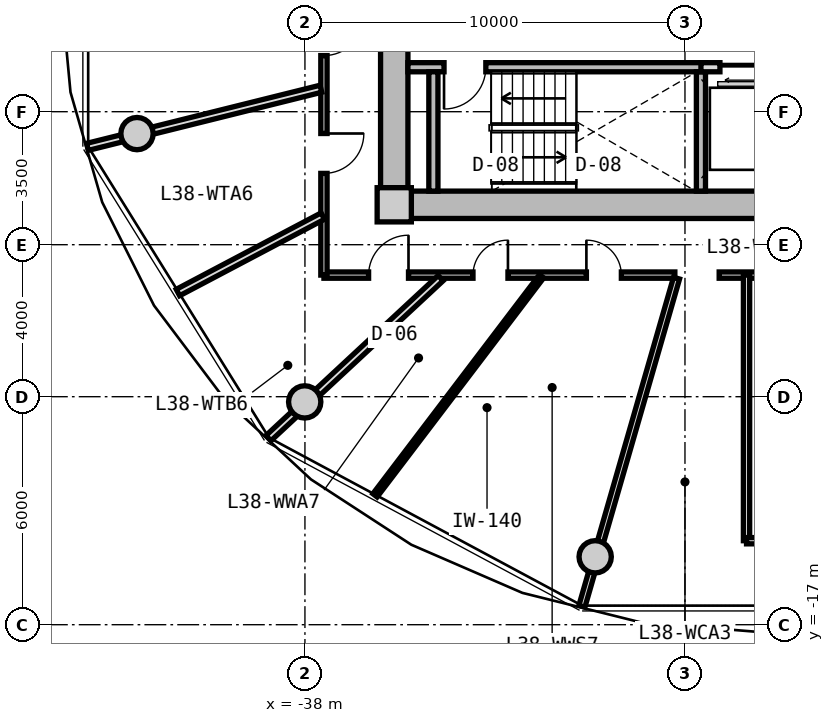
"""IFC4 building model, lengths in metres.
Left out: names, types, materials, properties, quantities, classifications, styles, units other than length and angle.
Written with IfcOpenShell. Run it as: python <this file> out.ifc"""

import sys

from ifc_helpers import new_model, si_unit, direction, frame, frame_2d, origin, origin_2d, place, context, subcontext, project, spatial, rectangle, circle, extrude, source, transform, mapped, element, fill, save


model = new_model("IFC4")
c1 = context("Model", 3, precision=1e-05, world=origin(), true_north=direction((0.0, 1.0)))
c2 = subcontext(c1, "Body", "Model", "MODEL_VIEW")
j1 = project(units=[si_unit("LENGTHUNIT", "METRE"), si_unit("PLANEANGLEUNIT", "RADIAN")], contexts=[c1])
p1 = place(None, origin())
s1 = spatial("IfcSite", under=j1, at=p1, CompositionType="ELEMENT")
p2 = place(p1, origin())
s2 = spatial("IfcBuilding", under=s1, at=p2, CompositionType="ELEMENT")
p3 = place(p2, frame((0.0, 0.0, 123.7)))
s3 = spatial("IfcBuildingStorey", under=s2, at=p3, CompositionType="ELEMENT", Elevation=123.7)
m1 = source(origin(), c2, "Body", "SweptSolid", [
    extrude(rectangle(XDim=0.9, YDim=0.9, at=origin_2d()), origin(), (0.0, 0.0, 1.0), 3.05),
])
p4 = place(p3, frame((-35.65, -5.95, 0.0), z_axis=(0.0, 0.0, 1.0), x_axis=(1.0, 0.0, 0.0)))
e1 = element("IfcColumn", 1, at=p4, inside=s3, PredefinedType="COLUMN", context=c2, shape_type="MappedRepresentation", body=[
    mapped(m1, transform((0.0, 0.0, 0.0), x_axis=(1.0, 0.0, 0.0), y_axis=(0.0, 1.0, 0.0), z_axis=(0.0, 0.0, 1.0), scale=1.0)),
])
m2 = source(origin(), c2, "Body", "SweptSolid", [
    extrude(rectangle(XDim=14.4, YDim=0.72, at=frame_2d((7.2, 0.0))), origin(), (0.0, 0.0, 1.0), 2.79),
])
p5 = place(p3, frame((-20.8, -5.95, 0.0), z_axis=(0.0, 0.0, 1.0), x_axis=(-1.0, 0.0, 0.0)))
e2 = element("IfcWall", 2, at=p5, inside=s3, PredefinedType="SHEAR", context=c2, shape_type="MappedRepresentation", body=[
    mapped(m2, transform((0.0, 0.0, 0.0), x_axis=(1.0, 0.0, 0.0), y_axis=(0.0, 1.0, 0.0), z_axis=(0.0, 0.0, 1.0), scale=1.0)),
])
m3 = source(origin(), c2, "Body", "SweptSolid", [
    extrude(rectangle(XDim=11.0, YDim=0.72, at=frame_2d((5.5, 0.0))), origin(), (0.0, 0.0, 1.0), 2.79),
])
p6 = place(p3, frame((-35.65, -5.5, 0.0), z_axis=(0.0, 0.0, 1.0), x_axis=(0.0, 1.0, 0.0)))
e3 = element("IfcWall", 3, at=p6, inside=s3, PredefinedType="SHEAR", context=c2, shape_type="MappedRepresentation", body=[
    mapped(m3, transform((0.0, 0.0, 0.0), x_axis=(1.0, 0.0, 0.0), y_axis=(0.0, 1.0, 0.0), z_axis=(0.0, 0.0, 1.0), scale=1.0)),
])
p7 = place(p6, frame((3.8, 0.0, 0.0)))
e4 = element("IfcOpeningElement", 4, at=p7, cuts=e3, PredefinedType="OPENING", context=c2, shape_type="SweptSolid", body=[
    extrude(rectangle(XDim=1.2, YDim=2.15, at=frame_2d((0.6, 1.075))), frame((0.0, 0.37, 0.0), z_axis=(0.0, -1.0, 0.0), x_axis=(1.0, 0.0, 0.0)), (0.0, 0.0, 1.0), 0.74),
])
m4 = source(origin(), c2, "Body", "SweptSolid", [
    extrude(circle(Radius=0.425, at=origin_2d()), origin(), (0.0, 0.0, 1.0), 3.05),
])
for number, where, z_axis, x_axis in (
    (5, (-42.419, -4.076, 0.0), (0.0, 0.0, 1.0), (1.0, 0.0, 0.0)),
    (6, (-38.006, -11.137, 0.0), (0.0, 0.0, 1.0), (1.0, 0.0, 0.0)),
    (7, (-30.363, -15.213, 0.0), (0.0, 0.0, 1.0), (1.0, 0.0, 0.0)),
):
    element("IfcColumn", number, at=place(p3, frame(where, z_axis=z_axis, x_axis=x_axis)), inside=s3, PredefinedType="COLUMN", context=c2, shape_type="MappedRepresentation", body=[
        mapped(m4, transform((0.0, 0.0, 0.0), x_axis=(1.0, 0.0, 0.0), y_axis=(0.0, 1.0, 0.0), z_axis=(0.0, 0.0, 1.0), scale=1.0)),
    ])
m5 = source(origin(), c2, "Body", "SweptSolid", [
    extrude(rectangle(XDim=7.83, YDim=0.24, at=frame_2d((3.915, 0.0))), origin(), (0.0, 0.0, 1.0), 2.79),
])
p8 = place(p3, frame((-35.29, -2.33, 0.0), z_axis=(0.0, 0.0, 1.0), x_axis=(1.0, 0.0, 0.0)))
e8 = element("IfcWall", 8, at=p8, inside=s3, PredefinedType="PARTITIONING", context=c2, shape_type="MappedRepresentation", body=[
    mapped(m5, transform((0.0, 0.0, 0.0), x_axis=(1.0, 0.0, 0.0), y_axis=(0.0, 1.0, 0.0), z_axis=(0.0, 0.0, 1.0), scale=1.0)),
])
p9 = place(p8, frame((0.95, 0.0, 0.0)))
e9 = element("IfcOpeningElement", 9, at=p9, cuts=e8, PredefinedType="OPENING", context=c2, shape_type="SweptSolid", body=[
    extrude(rectangle(XDim=1.1, YDim=2.15, at=frame_2d((0.55, 1.075))), frame((0.0, 0.13, 0.0), z_axis=(0.0, -1.0, 0.0), x_axis=(1.0, 0.0, 0.0)), (0.0, 0.0, 1.0), 0.26),
])
m6 = source(origin(), c2, "Body", "SweptSolid", [
    extrude(rectangle(XDim=3.14, YDim=0.24, at=frame_2d((1.57, 0.0))), origin(), (0.0, 0.0, 1.0), 2.79),
])
for number, where, z_axis, x_axis in (
    (10, (-34.62, -5.59, 0.0), (0.0, 0.0, 1.0), (0.0, 1.0, 0.0)),
    (11, (-27.58, -5.59, 0.0), (0.0, 0.0, 1.0), (0.0, 1.0, 0.0)),
):
    element("IfcWall", number, at=place(p3, frame(where, z_axis=z_axis, x_axis=x_axis)), inside=s3, PredefinedType="PARTITIONING", context=c2, shape_type="MappedRepresentation", body=[
        mapped(m6, transform((0.0, 0.0, 0.0), x_axis=(1.0, 0.0, 0.0), y_axis=(0.0, 1.0, 0.0), z_axis=(0.0, 0.0, 1.0), scale=1.0)),
    ])
m7 = source(origin(), c2, "Body", "SweptSolid", [
    extrude(rectangle(XDim=4.13, YDim=0.24, at=frame_2d((2.065, 0.0))), origin(), (0.0, 0.0, 1.0), 2.775),
])
p10 = place(p3, frame((-27.58, -2.33, 0.0), z_axis=(0.0, 0.0, 1.0), x_axis=(1.0, 0.0, 0.0)))
e12 = element("IfcWall", 12, at=p10, inside=s3, PredefinedType="PARTITIONING", context=c2, shape_type="MappedRepresentation", body=[
    mapped(m7, transform((0.0, 0.0, 0.0), x_axis=(1.0, 0.0, 0.0), y_axis=(0.0, 1.0, 0.0), z_axis=(0.0, 0.0, 1.0), scale=1.0)),
])
p11 = place(p10, frame((0.5, 0.0, 0.0)))
e13 = element("IfcOpeningElement", 13, at=p11, cuts=e12, PredefinedType="OPENING", context=c2, shape_type="SweptSolid", body=[
    extrude(rectangle(XDim=1.1, YDim=2.2, at=frame_2d((0.55, 1.1))), frame((0.0, 0.13, 0.0), z_axis=(0.0, -1.0, 0.0), x_axis=(1.0, 0.0, 0.0)), (0.0, 0.0, 1.0), 0.26),
])
m8 = source(origin(), c2, "Body", "SweptSolid", [
    extrude(rectangle(XDim=8.6, YDim=0.165, at=frame_2d((4.3, 0.0))), origin(), (0.0, 0.0, 1.0), 2.775),
])
p12 = place(p3, frame((-18.5, -7.8, 0.0), z_axis=(0.0, 0.0, 1.0), x_axis=(-1.0, 0.0, 0.0)))
e14 = element("IfcWall", 14, at=p12, inside=s3, PredefinedType="PARTITIONING", context=c2, shape_type="MappedRepresentation", body=[
    mapped(m8, transform((0.0, 0.0, 0.0), x_axis=(1.0, 0.0, 0.0), y_axis=(0.0, 1.0, 0.0), z_axis=(0.0, 0.0, 1.0), scale=1.0)),
])
p13 = place(p12, frame((3.509, 0.0, 0.0)))
e15 = element("IfcOpeningElement", 15, at=p13, cuts=e14, PredefinedType="OPENING", context=c2, shape_type="SweptSolid", body=[
    extrude(rectangle(XDim=1.05, YDim=2.15, at=frame_2d((0.525, 1.075))), frame((0.0, 0.093, 0.0), z_axis=(0.0, -1.0, 0.0), x_axis=(1.0, 0.0, 0.0)), (0.0, 0.0, 1.0), 0.185),
])
m9 = source(origin(), c2, "Body", "SweptSolid", [
    extrude(rectangle(XDim=9.234, YDim=0.165, at=frame_2d((4.617, 0.0))), origin(), (0.0, 0.0, 1.0), 2.775),
])
p14 = place(p3, frame((-28.266, -7.8, 0.0), z_axis=(0.0, 0.0, 1.0), x_axis=(-1.0, 0.0, 0.0)))
e16 = element("IfcWall", 16, at=p14, inside=s3, PredefinedType="PARTITIONING", context=c2, shape_type="MappedRepresentation", body=[
    mapped(m9, transform((0.0, 0.0, 0.0), x_axis=(1.0, 0.0, 0.0), y_axis=(0.0, 1.0, 0.0), z_axis=(0.0, 0.0, 1.0), scale=1.0)),
])
p15 = place(p14, frame((7.009, 0.0, 0.0)))
e17 = element("IfcOpeningElement", 17, at=p15, cuts=e16, PredefinedType="OPENING", context=c2, shape_type="SweptSolid", body=[
    extrude(rectangle(XDim=1.05, YDim=2.15, at=frame_2d((0.525, 1.075))), frame((0.0, 0.093, 0.0), z_axis=(0.0, -1.0, 0.0), x_axis=(1.0, 0.0, 0.0)), (0.0, 0.0, 1.0), 0.185),
])
p16 = place(p14, frame((4.392, 0.0, 0.0)))
e18 = element("IfcOpeningElement", 18, at=p16, cuts=e16, PredefinedType="OPENING", context=c2, shape_type="SweptSolid", body=[
    extrude(rectangle(XDim=0.92, YDim=2.1, at=frame_2d((0.46, 1.05))), frame((0.0, 0.093, 0.0), z_axis=(0.0, -1.0, 0.0), x_axis=(1.0, 0.0, 0.0)), (0.0, 0.0, 1.0), 0.185),
])
p17 = place(p14, frame((1.408, 0.0, 0.0)))
e19 = element("IfcOpeningElement", 19, at=p17, cuts=e16, PredefinedType="OPENING", context=c2, shape_type="SweptSolid", body=[
    extrude(rectangle(XDim=0.92, YDim=2.1, at=frame_2d((0.46, 1.05))), frame((0.0, 0.093, 0.0), z_axis=(0.0, -1.0, 0.0), x_axis=(1.0, 0.0, 0.0)), (0.0, 0.0, 1.0), 0.185),
])
m10 = source(origin(), c2, "Body", "SweptSolid", [
    extrude(rectangle(XDim=15.6, YDim=0.165, at=frame_2d((7.8, 0.0))), origin(), (0.0, 0.0, 1.0), 2.775),
])
p18 = place(p3, frame((-37.5, -7.8, 0.0), z_axis=(0.0, 0.0, 1.0), x_axis=(0.0, 1.0, 0.0)))
e20 = element("IfcWall", 20, at=p18, inside=s3, PredefinedType="PARTITIONING", context=c2, shape_type="MappedRepresentation", body=[
    mapped(m10, transform((0.0, 0.0, 0.0), x_axis=(1.0, 0.0, 0.0), y_axis=(0.0, 1.0, 0.0), z_axis=(0.0, 0.0, 1.0), scale=1.0)),
])
p19 = place(p18, frame((11.994, 0.0, 0.0)))
e21 = element("IfcOpeningElement", 21, at=p19, cuts=e20, PredefinedType="OPENING", context=c2, shape_type="SweptSolid", body=[
    extrude(rectangle(XDim=1.25, YDim=2.2, at=frame_2d((0.625, 1.1))), frame((0.0, 0.093, 0.0), z_axis=(0.0, -1.0, 0.0), x_axis=(1.0, 0.0, 0.0)), (0.0, 0.0, 1.0), 0.185),
])
p20 = place(p18, frame((7.984, 0.0, 0.0)))
e22 = element("IfcOpeningElement", 22, at=p20, cuts=e20, PredefinedType="OPENING", context=c2, shape_type="SweptSolid", body=[
    extrude(rectangle(XDim=1.05, YDim=2.15, at=frame_2d((0.525, 1.075))), frame((0.0, 0.093, 0.0), z_axis=(0.0, -1.0, 0.0), x_axis=(1.0, 0.0, 0.0)), (0.0, 0.0, 1.0), 0.185),
])
p21 = place(p18, frame((5.777, 0.0, 0.0)))
e23 = element("IfcOpeningElement", 23, at=p21, cuts=e20, PredefinedType="OPENING", context=c2, shape_type="SweptSolid", body=[
    extrude(rectangle(XDim=1.05, YDim=2.15, at=frame_2d((0.525, 1.075))), frame((0.0, 0.093, 0.0), z_axis=(0.0, -1.0, 0.0), x_axis=(1.0, 0.0, 0.0)), (0.0, 0.0, 1.0), 0.185),
])
p22 = place(p18, frame((2.676, 0.0, 0.0)))
e24 = element("IfcOpeningElement", 24, at=p22, cuts=e20, PredefinedType="OPENING", context=c2, shape_type="SweptSolid", body=[
    extrude(rectangle(XDim=1.05, YDim=2.15, at=frame_2d((0.525, 1.075))), frame((0.0, 0.093, 0.0), z_axis=(0.0, -1.0, 0.0), x_axis=(1.0, 0.0, 0.0)), (0.0, 0.0, 1.0), 0.185),
])
m11 = source(origin(), c2, "Body", "SweptSolid", [
    extrude(rectangle(XDim=8.989, YDim=0.165, at=frame_2d((4.495, 0.0))), origin(), (0.0, 0.0, 1.0), 2.275),
])
p23 = place(p3, frame((-28.222, -7.88, 0.0), z_axis=(0.0, 0.0, 1.0), x_axis=(-0.27702323008, -0.960863221274, 0.0)))
e25 = element("IfcWall", 25, at=p23, inside=s3, PredefinedType="PARTITIONING", context=c2, shape_type="MappedRepresentation", body=[
    mapped(m11, transform((0.0, 0.0, 0.0), x_axis=(1.0, 0.0, 0.0), y_axis=(0.0, 1.0, 0.0), z_axis=(0.0, 0.0, 1.0), scale=1.0)),
])
m12 = source(origin(), c2, "Body", "SweptSolid", [
    extrude(rectangle(XDim=6.99, YDim=0.165, at=frame_2d((3.495, 0.0))), origin(), (0.0, 0.0, 1.0), 2.775),
])
p24 = place(p3, frame((-26.38, -14.79, 0.0), z_axis=(0.0, 0.0, 1.0), x_axis=(0.0, 1.0, 0.0)))
e26 = element("IfcWall", 26, at=p24, inside=s3, PredefinedType="PARTITIONING", context=c2, shape_type="MappedRepresentation", body=[
    mapped(m12, transform((0.0, 0.0, 0.0), x_axis=(1.0, 0.0, 0.0), y_axis=(0.0, 1.0, 0.0), z_axis=(0.0, 0.0, 1.0), scale=1.0)),
])
m13 = source(origin(), c2, "Body", "SweptSolid", [
    extrude(rectangle(XDim=8.669, YDim=0.165, at=frame_2d((4.335, 0.0))), origin(), (0.0, 0.0, 1.0), 2.775),
])
p25 = place(p3, frame((-26.38, -14.79, 0.0), z_axis=(0.0, 0.0, 1.0), x_axis=(1.0, 0.0, 0.0)))
e27 = element("IfcWall", 27, at=p25, inside=s3, PredefinedType="PARTITIONING", context=c2, shape_type="MappedRepresentation", body=[
    mapped(m13, transform((0.0, 0.0, 0.0), x_axis=(1.0, 0.0, 0.0), y_axis=(0.0, 1.0, 0.0), z_axis=(0.0, 0.0, 1.0), scale=1.0)),
])
m14 = source(origin(), c2, "Body", "SweptSolid", [
    extrude(rectangle(XDim=6.331, YDim=0.19, at=frame_2d((3.165, 0.0))), origin(), (0.0, 0.0, 1.0), 2.275),
])
p26 = place(p3, frame((-37.58, -2.896, 0.0), z_axis=(0.0, 0.0, 1.0), x_axis=(-0.97036440661, -0.241646267062, 0.0)))
e28 = element("IfcWall", 28, at=p26, inside=s3, PredefinedType="PARTITIONING", context=c2, shape_type="MappedRepresentation", body=[
    mapped(m14, transform((0.0, 0.0, 0.0), x_axis=(1.0, 0.0, 0.0), y_axis=(0.0, 1.0, 0.0), z_axis=(0.0, 0.0, 1.0), scale=1.0)),
])
m15 = source(origin(), c2, "Body", "SweptSolid", [
    extrude(rectangle(XDim=6.187, YDim=0.19, at=frame_2d((3.093, 0.0))), origin(), (0.0, 0.0, 1.0), 2.275),
])
p27 = place(p3, frame((-34.429, -7.88, 0.0), z_axis=(0.0, 0.0, 1.0), x_axis=(-0.732501077882, -0.680765870841, 0.0)))
e29 = element("IfcWall", 29, at=p27, inside=s3, PredefinedType="PARTITIONING", context=c2, shape_type="MappedRepresentation", body=[
    mapped(m15, transform((0.0, 0.0, 0.0), x_axis=(1.0, 0.0, 0.0), y_axis=(0.0, 1.0, 0.0), z_axis=(0.0, 0.0, 1.0), scale=1.0)),
])
m16 = source(origin(), c2, "Body", "SweptSolid", [
    extrude(rectangle(XDim=4.31, YDim=0.19, at=frame_2d((2.155, 0.0))), origin(), (0.0, 0.0, 1.0), 2.775),
])
p28 = place(p3, frame((-37.53, -6.248, 0.0), z_axis=(0.0, 0.0, 1.0), x_axis=(-0.884459441503, -0.466617076773, 0.0)))
e30 = element("IfcWall", 30, at=p28, inside=s3, PredefinedType="PARTITIONING", context=c2, shape_type="MappedRepresentation", body=[
    mapped(m16, transform((0.0, 0.0, 0.0), x_axis=(1.0, 0.0, 0.0), y_axis=(0.0, 1.0, 0.0), z_axis=(0.0, 0.0, 1.0), scale=1.0)),
])
m17 = source(origin(), c2, "Body", "SweptSolid", [
    extrude(rectangle(XDim=7.243, YDim=0.14, at=frame_2d((3.621, 0.0))), origin(), (0.0, 0.0, 1.0), 2.775),
])
p29 = place(p3, frame((-31.774, -7.83, 0.0), z_axis=(0.0, 0.0, 1.0), x_axis=(-0.605111472002, -0.796140757939, 0.0)))
e31 = element("IfcWall", 31, at=p29, inside=s3, PredefinedType="PARTITIONING", context=c2, shape_type="MappedRepresentation", body=[
    mapped(m17, transform((0.0, 0.0, 0.0), x_axis=(1.0, 0.0, 0.0), y_axis=(0.0, 1.0, 0.0), z_axis=(0.0, 0.0, 1.0), scale=1.0)),
])
m18 = source(origin(), c2, "Body", "SweptSolid", [
    extrude(rectangle(XDim=1.1, YDim=2.15, at=frame_2d((0.55, 1.075))), frame((0.0, 0.025, 0.0), z_axis=(0.0, -1.0, 0.0), x_axis=(1.0, 0.0, 0.0)), (0.0, 0.0, 1.0), 0.05),
])
p30 = place(p9, frame((1.1, 0.0, 0.0), z_axis=(0.0, 0.0, 1.0), x_axis=(-1.0, 0.0, 0.0)))
e32 = element("IfcDoor", 32, at=p30, inside=s3, OperationType="SINGLE_SWING_RIGHT", PredefinedType="DOOR", context=c2, shape_type="MappedRepresentation", body=[
    mapped(m18, transform((0.0, 0.0, 0.0), x_axis=(1.0, 0.0, 0.0), y_axis=(0.0, 1.0, 0.0), z_axis=(0.0, 0.0, 1.0), scale=1.0)),
])
fill(e9, e32)
m19 = source(origin(), c2, "Body", "SweptSolid", [
    extrude(rectangle(XDim=1.1, YDim=2.2, at=frame_2d((0.55, 1.1))), frame((0.0, 0.025, 0.0), z_axis=(0.0, -1.0, 0.0), x_axis=(1.0, 0.0, 0.0)), (0.0, 0.0, 1.0), 0.05),
])
p31 = place(p11, frame((1.1, 0.0, 0.0), z_axis=(0.0, 0.0, 1.0), x_axis=(-1.0, 0.0, 0.0)))
e33 = element("IfcDoor", 33, at=p31, inside=s3, OperationType="SLIDING_TO_LEFT", PredefinedType="DOOR", context=c2, shape_type="MappedRepresentation", body=[
    mapped(m19, transform((0.0, 0.0, 0.0), x_axis=(1.0, 0.0, 0.0), y_axis=(0.0, 1.0, 0.0), z_axis=(0.0, 0.0, 1.0), scale=1.0)),
])
fill(e13, e33)
m20 = source(origin(), c2, "Body", "SweptSolid", [
    extrude(rectangle(XDim=1.05, YDim=2.15, at=frame_2d((0.525, 1.075))), frame((0.0, 0.025, 0.0), z_axis=(0.0, -1.0, 0.0), x_axis=(1.0, 0.0, 0.0)), (0.0, 0.0, 1.0), 0.05),
])
p32 = place(p21, frame((1.05, 0.0, 0.0), z_axis=(0.0, 0.0, 1.0), x_axis=(-1.0, 0.0, 0.0)))
e34 = element("IfcDoor", 34, at=p32, inside=s3, OperationType="SINGLE_SWING_LEFT", PredefinedType="DOOR", context=c2, shape_type="MappedRepresentation", body=[
    mapped(m20, transform((0.0, 0.0, 0.0), x_axis=(1.0, 0.0, 0.0), y_axis=(0.0, 1.0, 0.0), z_axis=(0.0, 0.0, 1.0), scale=1.0)),
])
fill(e23, e34)
p33 = place(p22, frame((1.05, 0.0, 0.0), z_axis=(0.0, 0.0, 1.0), x_axis=(-1.0, 0.0, 0.0)))
e35 = element("IfcDoor", 35, at=p33, inside=s3, OperationType="SINGLE_SWING_LEFT", PredefinedType="DOOR", context=c2, shape_type="MappedRepresentation", body=[
    mapped(m20, transform((0.0, 0.0, 0.0), x_axis=(1.0, 0.0, 0.0), y_axis=(0.0, 1.0, 0.0), z_axis=(0.0, 0.0, 1.0), scale=1.0)),
])
fill(e24, e35)
p34 = place(p15, frame((1.05, 0.0, 0.0), z_axis=(0.0, 0.0, 1.0), x_axis=(-1.0, 0.0, 0.0)))
e36 = element("IfcDoor", 36, at=p34, inside=s3, OperationType="SINGLE_SWING_RIGHT", PredefinedType="DOOR", context=c2, shape_type="MappedRepresentation", body=[
    mapped(m20, transform((0.0, 0.0, 0.0), x_axis=(1.0, 0.0, 0.0), y_axis=(0.0, 1.0, 0.0), z_axis=(0.0, 0.0, 1.0), scale=1.0)),
])
fill(e17, e36)
m21 = source(origin(), c2, "Body", "SweptSolid", [
    extrude(rectangle(XDim=0.92, YDim=2.1, at=frame_2d((0.46, 1.05))), frame((0.0, 0.025, 0.0), z_axis=(0.0, -1.0, 0.0), x_axis=(1.0, 0.0, 0.0)), (0.0, 0.0, 1.0), 0.05),
])
p35 = place(p16, frame((0.92, 0.0, 0.0), z_axis=(0.0, 0.0, 1.0), x_axis=(-1.0, 0.0, 0.0)))
e37 = element("IfcDoor", 37, at=p35, inside=s3, OperationType="SINGLE_SWING_RIGHT", PredefinedType="DOOR", context=c2, shape_type="MappedRepresentation", body=[
    mapped(m21, transform((0.0, 0.0, 0.0), x_axis=(1.0, 0.0, 0.0), y_axis=(0.0, 1.0, 0.0), z_axis=(0.0, 0.0, 1.0), scale=1.0)),
])
fill(e18, e37)
p36 = place(p17, frame((0.92, 0.0, 0.0), z_axis=(0.0, 0.0, 1.0), x_axis=(-1.0, 0.0, 0.0)))
e38 = element("IfcDoor", 38, at=p36, inside=s3, OperationType="SINGLE_SWING_LEFT", PredefinedType="DOOR", context=c2, shape_type="MappedRepresentation", body=[
    mapped(m21, transform((0.0, 0.0, 0.0), x_axis=(1.0, 0.0, 0.0), y_axis=(0.0, 1.0, 0.0), z_axis=(0.0, 0.0, 1.0), scale=1.0)),
])
fill(e19, e38)
save(model, sys.argv[1])
